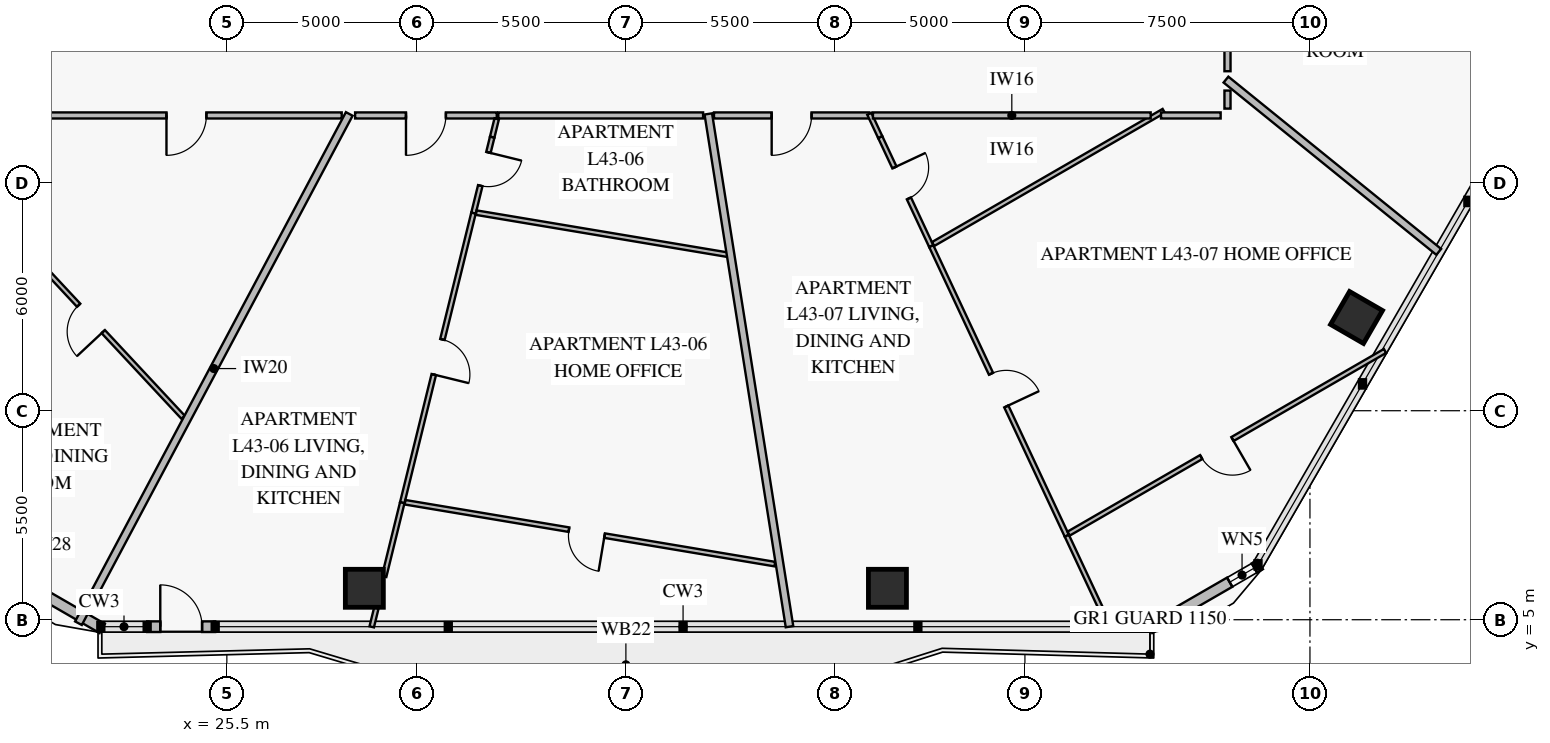
"""IFC4 building model, lengths in metres.
Left out: names, types, materials, properties, quantities, classifications, styles, units other than length and angle.
Written with IfcOpenShell. Run it as: python <this file> out.ifc"""

import sys

from ifc_helpers import new_model, si_unit, direction, frame, frame_2d, origin, origin_2d, place, context, subcontext, project, spatial, rectangle, extrude, element, fill, save


model = new_model("IFC4")
c1 = context("Model", 3, precision=1e-05, world=origin(), true_north=direction((0.0, 1.0)))
c2 = subcontext(c1, "Body", "Model", "MODEL_VIEW")
j1 = project(units=[si_unit("LENGTHUNIT", "METRE"), si_unit("PLANEANGLEUNIT", "RADIAN")], contexts=[c1])
p1 = place(None, origin())
s1 = spatial("IfcSite", under=j1, at=p1, CompositionType="ELEMENT")
p2 = place(p1, origin())
s2 = spatial("IfcBuilding", under=s1, at=p2, CompositionType="ELEMENT")
p3 = place(p2, frame((0.0, 0.0, 173.2)))
s3 = spatial("IfcBuildingStorey", under=s2, at=p3, CompositionType="ELEMENT", Elevation=173.2)
for number, where, z_axis, x_axis in (
    (1, (29.118, 5.827, 0.0), (0.0, 0.0, 1.0), (1.0, 0.0, 0.0)),
    (2, (42.882, 5.827, 0.0), (0.0, 0.0, 1.0), (1.0, 0.0, 0.0)),
    (3, (55.226, 12.953, 0.0), (0.0, 0.0, 1.0), (0.5, 0.866, 0.0)),
):
    element("IfcColumn", number, at=place(p3, frame(where, z_axis=z_axis, x_axis=x_axis)), inside=s3, PredefinedType="COLUMN", context=c2, shape_type="SweptSolid", body=[
        extrude(rectangle(XDim=1.0, YDim=1.0, at=origin_2d()), origin(), (0.0, 0.0, 1.0), 3.55),
    ])
p4 = place(p3, frame((52.693, 6.452, 0.0), z_axis=(0.0, 0.0, 1.0), x_axis=(-0.866020068361, -0.500009241111, 0.0)))
e4 = element("IfcWall", 4, at=p4, inside=s3, PredefinedType="SOLIDWALL", context=c2, shape_type="SweptSolid", body=[
    extrude(rectangle(XDim=3.365, YDim=0.28, at=frame_2d((1.683, 0.0))), origin(), (0.0, 0.0, 1.0), 3.55),
])
p5 = place(p4, frame((0.179, 0.0, 0.85)))
e5 = element("IfcOpeningElement", 5, at=p5, cuts=e4, PredefinedType="OPENING", context=c2, shape_type="SweptSolid", body=[
    extrude(rectangle(XDim=0.75, YDim=1.5, at=frame_2d((0.375, 0.75))), frame((0.0, 0.152, 0.0), z_axis=(0.0, -1.0, 0.0), x_axis=(1.0, 0.0, 0.0)), (0.0, 0.0, 1.0), 0.304),
])
p6 = place(p3, frame((25.193, 4.817, 0.0), z_axis=(0.0, 0.0, 1.0), x_axis=(-1.0, 0.0, 0.0)))
e6 = element("IfcWall", 6, at=p6, inside=s3, PredefinedType="SOLIDWALL", context=c2, shape_type="SweptSolid", body=[
    extrude(rectangle(XDim=1.79, YDim=0.28, at=frame_2d((0.895, 0.0))), origin(), (0.0, 0.0, 1.0), 3.55),
])
p7 = place(p6, frame((0.345, 0.0, 0.0)))
e7 = element("IfcOpeningElement", 7, at=p7, cuts=e6, PredefinedType="OPENING", context=c2, shape_type="SweptSolid", body=[
    extrude(rectangle(XDim=1.1, YDim=2.2, at=frame_2d((0.55, 1.1))), frame((0.0, 0.152, 0.0), z_axis=(0.0, -1.0, 0.0), x_axis=(1.0, 0.0, 0.0)), (0.0, 0.0, 1.0), 0.304),
])
p8 = place(p3, frame((22.221, 4.769, 0.0), z_axis=(0.0, 0.0, 1.0), x_axis=(-0.866020068361, 0.500009241111, 0.0)))
e8 = element("IfcWall", 8, at=p8, inside=s3, PredefinedType="SOLIDWALL", context=c2, shape_type="SweptSolid", body=[
    extrude(rectangle(XDim=3.365, YDim=0.28, at=frame_2d((1.683, 0.0))), origin(), (0.0, 0.0, 1.0), 3.55),
])
p9 = place(p3, frame((16.302, 18.958, 0.0), z_axis=(0.0, 0.0, 1.0), x_axis=(0.681998933698, -0.731353166695, 0.0)))
e9 = element("IfcWall", 9, at=p9, inside=s3, PredefinedType="PARTITIONING", context=c2, shape_type="SweptSolid", body=[
    extrude(rectangle(XDim=11.798, YDim=0.12, at=frame_2d((5.899, 0.0))), origin(), (0.0, 0.0, 1.0), 2.9),
])
p10 = place(p9, frame((2.11, 0.0, 0.0)))
e10 = element("IfcOpeningElement", 10, at=p10, cuts=e9, PredefinedType="OPENING", context=c2, shape_type="SweptSolid", body=[
    extrude(rectangle(XDim=0.95, YDim=2.1, at=frame_2d((0.475, 1.05))), frame((0.0, 0.072, 0.0), z_axis=(0.0, -1.0, 0.0), x_axis=(1.0, 0.0, 0.0)), (0.0, 0.0, 1.0), 0.144),
])
p11 = place(p9, frame((7.769, 0.0, 0.0)))
e11 = element("IfcOpeningElement", 11, at=p11, cuts=e9, PredefinedType="OPENING", context=c2, shape_type="SweptSolid", body=[
    extrude(rectangle(XDim=0.95, YDim=2.1, at=frame_2d((0.475, 1.05))), frame((0.0, 0.072, 0.0), z_axis=(0.0, -1.0, 0.0), x_axis=(1.0, 0.0, 0.0)), (0.0, 0.0, 1.0), 0.144),
])
p12 = place(p3, frame((20.35, 18.27, 0.0), z_axis=(0.0, 0.0, 1.0), x_axis=(1.0, 0.0, 0.0)))
e12 = element("IfcWall", 12, at=p12, inside=s3, PredefinedType="PARTITIONING", context=c2, shape_type="SweptSolid", body=[
    extrude(rectangle(XDim=8.172, YDim=0.16, at=frame_2d((4.086, 0.0))), origin(), (0.0, 0.0, 1.0), 2.9),
])
p13 = place(p12, frame((3.561, 0.0, 0.0)))
e13 = element("IfcOpeningElement", 13, at=p13, cuts=e12, PredefinedType="OPENING", context=c2, shape_type="SweptSolid", body=[
    extrude(rectangle(XDim=1.05, YDim=2.15, at=frame_2d((0.525, 1.075))), frame((0.0, 0.092, 0.0), z_axis=(0.0, -1.0, 0.0), x_axis=(1.0, 0.0, 0.0)), (0.0, 0.0, 1.0), 0.184),
])
p14 = place(p3, frame((32.482, 17.7, 0.0), z_axis=(0.0, 0.0, 1.0), x_axis=(-0.238993265464, -0.971021224826, 0.0)))
e14 = element("IfcWall", 14, at=p14, inside=s3, PredefinedType="PARTITIONING", context=c2, shape_type="SweptSolid", body=[
    extrude(rectangle(XDim=2.061, YDim=0.12, at=frame_2d((1.03, 0.0))), origin(), (0.0, 0.0, 1.0), 3.55),
])
p15 = place(p14, frame((0.415, 0.0, 0.0)))
e15 = element("IfcOpeningElement", 15, at=p15, cuts=e14, PredefinedType="OPENING", context=c2, shape_type="SweptSolid", body=[
    extrude(rectangle(XDim=0.9, YDim=2.1, at=frame_2d((0.45, 1.05))), frame((0.0, 0.072, 0.0), z_axis=(0.0, -1.0, 0.0), x_axis=(1.0, 0.0, 0.0)), (0.0, 0.0, 1.0), 0.144),
])
p16 = place(p3, frame((31.99, 15.699, 0.0), z_axis=(0.0, 0.0, 1.0), x_axis=(-0.238859295783, -0.971054188405, 0.0)))
e16 = element("IfcWall", 16, at=p16, inside=s3, PredefinedType="PARTITIONING", context=c2, shape_type="SweptSolid", body=[
    extrude(rectangle(XDim=7.848, YDim=0.12, at=frame_2d((3.924, 0.0))), origin(), (0.0, 0.0, 1.0), 3.15),
])
p17 = place(p16, frame((3.424, 0.0, 0.0)))
e17 = element("IfcOpeningElement", 17, at=p17, cuts=e16, PredefinedType="OPENING", context=c2, shape_type="SweptSolid", body=[
    extrude(rectangle(XDim=0.95, YDim=2.1, at=frame_2d((0.475, 1.05))), frame((0.0, 0.072, 0.0), z_axis=(0.0, -1.0, 0.0), x_axis=(1.0, 0.0, 0.0)), (0.0, 0.0, 1.0), 0.144),
])
p18 = place(p3, frame((30.189, 8.092, 0.0), z_axis=(0.0, 0.0, 1.0), x_axis=(0.986287356635, -0.165037117469, 0.0)))
e18 = element("IfcWall", 18, at=p18, inside=s3, PredefinedType="PARTITIONING", context=c2, shape_type="SweptSolid", body=[
    extrude(rectangle(XDim=9.864, YDim=0.12, at=frame_2d((4.932, 0.0))), origin(), (0.0, 0.0, 1.0), 3.55),
])
p19 = place(p18, frame((4.373, 0.0, 0.0)))
e19 = element("IfcOpeningElement", 19, at=p19, cuts=e18, PredefinedType="OPENING", context=c2, shape_type="SweptSolid", body=[
    extrude(rectangle(XDim=0.95, YDim=2.1, at=frame_2d((0.475, 1.05))), frame((0.0, 0.072, 0.0), z_axis=(0.0, -1.0, 0.0), x_axis=(1.0, 0.0, 0.0)), (0.0, 0.0, 1.0), 0.144),
])
p20 = place(p3, frame((28.875, 18.27, 0.0), z_axis=(0.0, 0.0, 1.0), x_axis=(1.0, 0.0, 0.0)))
e20 = element("IfcWall", 20, at=p20, inside=s3, PredefinedType="PARTITIONING", context=c2, shape_type="SweptSolid", body=[
    extrude(rectangle(XDim=3.727, YDim=0.16, at=frame_2d((1.863, 0.0))), origin(), (0.0, 0.0, 1.0), 2.9),
])
p21 = place(p20, frame((1.338, 0.0, 0.0)))
e21 = element("IfcOpeningElement", 21, at=p21, cuts=e20, PredefinedType="OPENING", context=c2, shape_type="SweptSolid", body=[
    extrude(rectangle(XDim=1.05, YDim=2.15, at=frame_2d((0.525, 1.075))), frame((0.0, 0.092, 0.0), z_axis=(0.0, -1.0, 0.0), x_axis=(1.0, 0.0, 0.0)), (0.0, 0.0, 1.0), 0.184),
])
p22 = place(p3, frame((42.692, 17.7, 0.0), z_axis=(0.0, 0.0, 1.0), x_axis=(0.423922627961, -0.905698407585, 0.0)))
e22 = element("IfcWall", 22, at=p22, inside=s3, PredefinedType="PARTITIONING", context=c2, shape_type="SweptSolid", body=[
    extrude(rectangle(XDim=3.169, YDim=0.12, at=frame_2d((1.584, 0.0))), origin(), (0.0, 0.0, 1.0), 3.55),
])
p23 = place(p22, frame((0.881, 0.0, 0.0)))
e23 = element("IfcOpeningElement", 23, at=p23, cuts=e22, PredefinedType="OPENING", context=c2, shape_type="SweptSolid", body=[
    extrude(rectangle(XDim=0.9, YDim=2.1, at=frame_2d((0.45, 1.05))), frame((0.0, 0.072, 0.0), z_axis=(0.0, -1.0, 0.0), x_axis=(1.0, 0.0, 0.0)), (0.0, 0.0, 1.0), 0.144),
])
p24 = place(p3, frame((44.036, 14.83, 0.0), z_axis=(0.0, 0.0, 1.0), x_axis=(0.423895538652, -0.905711086556, 0.0)))
e24 = element("IfcWall", 24, at=p24, inside=s3, PredefinedType="PARTITIONING", context=c2, shape_type="SweptSolid", body=[
    extrude(rectangle(XDim=8.413, YDim=0.12, at=frame_2d((4.207, 0.0))), origin(), (0.0, 0.0, 1.0), 2.87),
])
p25 = place(p24, frame((3.707, 0.0, 0.0)))
e25 = element("IfcOpeningElement", 25, at=p25, cuts=e24, PredefinedType="OPENING", context=c2, shape_type="SweptSolid", body=[
    extrude(rectangle(XDim=0.95, YDim=2.1, at=frame_2d((0.475, 1.05))), frame((0.0, 0.072, 0.0), z_axis=(0.0, -1.0, 0.0), x_axis=(1.0, 0.0, 0.0)), (0.0, 0.0, 1.0), 0.144),
])
p26 = place(p3, frame((47.651, 7.266, 0.0), z_axis=(0.0, 0.0, 1.0), x_axis=(0.86602613873, 0.499998727035, 0.0)))
e26 = element("IfcWall", 26, at=p26, inside=s3, PredefinedType="PARTITIONING", context=c2, shape_type="SweptSolid", body=[
    extrude(rectangle(XDim=9.613, YDim=0.12, at=frame_2d((4.806, 0.0))), origin(), (0.0, 0.0, 1.0), 3.122),
])
p27 = place(p26, frame((4.027, 0.0, 0.0)))
e27 = element("IfcOpeningElement", 27, at=p27, cuts=e26, PredefinedType="OPENING", context=c2, shape_type="SweptSolid", body=[
    extrude(rectangle(XDim=0.95, YDim=2.1, at=frame_2d((0.475, 1.05))), frame((0.0, 0.072, 0.0), z_axis=(0.0, -1.0, 0.0), x_axis=(1.0, 0.0, 0.0)), (0.0, 0.0, 1.0), 0.144),
])
p28 = place(p3, frame((38.318, 18.27, 0.0), z_axis=(0.0, 0.0, 1.0), x_axis=(1.0, 0.0, 0.0)))
e28 = element("IfcWall", 28, at=p28, inside=s3, PredefinedType="PARTITIONING", context=c2, shape_type="SweptSolid", body=[
    extrude(rectangle(XDim=4.086, YDim=0.16, at=frame_2d((2.043, 0.0))), origin(), (0.0, 0.0, 1.0), 2.9),
])
p29 = place(p28, frame((1.518, 0.0, 0.0)))
e29 = element("IfcOpeningElement", 29, at=p29, cuts=e28, PredefinedType="OPENING", context=c2, shape_type="SweptSolid", body=[
    extrude(rectangle(XDim=1.05, YDim=2.15, at=frame_2d((0.525, 1.075))), frame((0.0, 0.092, 0.0), z_axis=(0.0, -1.0, 0.0), x_axis=(1.0, 0.0, 0.0)), (0.0, 0.0, 1.0), 0.184),
])
p30 = place(p3, frame((28.721, 18.31, 0.0), z_axis=(0.0, 0.0, 1.0), x_axis=(-0.469463317487, -0.882951976913, 0.0)))
e30 = element("IfcWall", 30, at=p30, inside=s3, PredefinedType="PARTITIONING", context=c2, shape_type="SweptSolid", body=[
    extrude(rectangle(XDim=15.178, YDim=0.2, at=frame_2d((7.589, 0.0))), origin(), (0.0, 0.0, 1.0), 2.87),
])
p31 = place(p3, frame((32.601, 18.182, 0.0), z_axis=(0.0, 0.0, 1.0), x_axis=(-0.238597992299, -0.971118426388, 0.0)))
e31 = element("IfcWall", 31, at=p31, inside=s3, PredefinedType="PARTITIONING", context=c2, shape_type="SweptSolid", body=[
    extrude(rectangle(XDim=0.496, YDim=0.12, at=frame_2d((0.248, 0.0))), origin(), (0.0, 0.0, 1.0), 3.55),
])
p32 = place(p3, frame((30.115, 8.079, 0.0), z_axis=(0.0, 0.0, 1.0), x_axis=(-0.238912739116, -0.971041040887, 0.0)))
e32 = element("IfcWall", 32, at=p32, inside=s3, PredefinedType="PARTITIONING", context=c2, shape_type="SweptSolid", body=[
    extrude(rectangle(XDim=1.999, YDim=0.12, at=frame_2d((1.0, 0.0))), origin(), (0.0, 0.0, 1.0), 3.55),
])
p33 = place(p3, frame((29.434, 5.307, 0.0), z_axis=(0.0, 0.0, 1.0), x_axis=(-0.238810360324, -0.97106622421, 0.0)))
e33 = element("IfcWall", 33, at=p33, inside=s3, PredefinedType="PARTITIONING", context=c2, shape_type="SweptSolid", body=[
    extrude(rectangle(XDim=0.509, YDim=0.12, at=frame_2d((0.254, 0.0))), origin(), (0.0, 0.0, 1.0), 3.55),
])
p34 = place(p3, frame((32.063, 15.712, 0.0), z_axis=(0.0, 0.0, 1.0), x_axis=(0.986279965102, -0.165081284339, 0.0)))
e34 = element("IfcWall", 34, at=p34, inside=s3, PredefinedType="PARTITIONING", context=c2, shape_type="SweptSolid", body=[
    extrude(rectangle(XDim=6.73, YDim=0.12, at=frame_2d((3.365, 0.0))), origin(), (0.0, 0.0, 1.0), 3.55),
])
p35 = place(p3, frame((38.168, 18.31, 0.0), z_axis=(0.0, 0.0, 1.0), x_axis=(0.156441591032, -0.987687211923, 0.0)))
e35 = element("IfcWall", 35, at=p35, inside=s3, PredefinedType="PARTITIONING", context=c2, shape_type="SweptSolid", body=[
    extrude(rectangle(XDim=13.661, YDim=0.2, at=frame_2d((6.831, 0.0))), origin(), (0.0, 0.0, 1.0), 2.87),
])
p36 = place(p3, frame((42.406, 18.312, 0.0), z_axis=(0.0, 0.0, 1.0), x_axis=(0.423814093748, -0.905749200353, 0.0)))
e36 = element("IfcWall", 36, at=p36, inside=s3, PredefinedType="PARTITIONING", context=c2, shape_type="SweptSolid", body=[
    extrude(rectangle(XDim=0.676, YDim=0.12, at=frame_2d((0.338, 0.0))), origin(), (0.0, 0.0, 1.0), 3.55),
])
p37 = place(p3, frame((47.602, 7.209, 0.0), z_axis=(0.0, 0.0, 1.0), x_axis=(0.423895034456, -0.905711322532, 0.0)))
e37 = element("IfcWall", 37, at=p37, inside=s3, PredefinedType="PARTITIONING", context=c2, shape_type="SweptSolid", body=[
    extrude(rectangle(XDim=2.647, YDim=0.12, at=frame_2d((1.323, 0.0))), origin(), (0.0, 0.0, 1.0), 3.55),
])
p38 = place(p3, frame((44.084, 14.886, 0.0), z_axis=(0.0, 0.0, 1.0), x_axis=(0.866034731829, 0.499983843005, 0.0)))
e38 = element("IfcWall", 38, at=p38, inside=s3, PredefinedType="PARTITIONING", context=c2, shape_type="SweptSolid", body=[
    extrude(rectangle(XDim=7.007, YDim=0.12, at=frame_2d((3.503, 0.0))), origin(), (0.0, 0.0, 1.0), 2.9),
])
p39 = place(p3, frame((51.79, 19.213, 0.0), z_axis=(0.0, 0.0, 1.0), x_axis=(0.777161996324, -0.629300589122, 0.0)))
e39 = element("IfcWall", 39, at=p39, inside=s3, PredefinedType="PARTITIONING", context=c2, shape_type="SweptSolid", body=[
    extrude(rectangle(XDim=7.204, YDim=0.2, at=frame_2d((3.602, 0.0))), origin(), (0.0, 0.0, 1.0), 2.87),
])
p40 = place(p3, frame((32.643, 18.27, 0.0), z_axis=(0.0, 0.0, 1.0), x_axis=(1.0, 0.0, 0.0)))
e40 = element("IfcWall", 40, at=p40, inside=s3, PredefinedType="PARTITIONING", context=c2, shape_type="SweptSolid", body=[
    extrude(rectangle(XDim=5.389, YDim=0.16, at=frame_2d((2.694, 0.0))), origin(), (0.0, 0.0, 1.0), 3.55),
])
p41 = place(p3, frame((42.501, 18.27, 0.0), z_axis=(0.0, 0.0, 1.0), x_axis=(1.0, 0.0, 0.0)))
e41 = element("IfcWall", 41, at=p41, inside=s3, PredefinedType="PARTITIONING", context=c2, shape_type="SweptSolid", body=[
    extrude(rectangle(XDim=7.308, YDim=0.16, at=frame_2d((3.654, 0.0))), origin(), (0.0, 0.0, 1.0), 2.9),
])
p42 = place(p3, frame((50.081, 18.27, 0.0), z_axis=(0.0, 0.0, 1.0), x_axis=(1.0, 0.0, 0.0)))
e42 = element("IfcWall", 42, at=p42, inside=s3, PredefinedType="PARTITIONING", context=c2, shape_type="SweptSolid", body=[
    extrude(rectangle(XDim=1.569, YDim=0.16, at=frame_2d((0.785, 0.0))), origin(), (0.0, 0.0, 1.0), 3.15),
])
p43 = place(p3, frame((51.83, 18.45, 0.0), z_axis=(0.0, 0.0, 1.0), x_axis=(0.0, 1.0, 0.0)))
e43 = element("IfcWall", 43, at=p43, inside=s3, PredefinedType="PARTITIONING", context=c2, shape_type="SweptSolid", body=[
    extrude(rectangle(XDim=0.475, YDim=0.16, at=frame_2d((0.237, 0.0))), origin(), (0.0, 0.0, 1.0), 3.55),
])
p44 = place(p3, frame((51.83, 19.434, 0.0), z_axis=(0.0, 0.0, 1.0), x_axis=(0.0, 1.0, 0.0)))
e44 = element("IfcWall", 44, at=p44, inside=s3, PredefinedType="PARTITIONING", context=c2, shape_type="SweptSolid", body=[
    extrude(rectangle(XDim=2.716, YDim=0.16, at=frame_2d((1.358, 0.0))), origin(), (0.0, 0.0, 1.0), 3.15),
])
p45 = place(p5, origin())
e45 = element("IfcWindow", 45, at=p45, inside=s3, PartitioningType="SINGLE_PANEL", PredefinedType="WINDOW", context=c2, shape_type="SweptSolid", body=[
    extrude(rectangle(XDim=0.75, YDim=1.5, at=frame_2d((0.375, 0.75))), frame((0.0, 0.03, 0.0), z_axis=(0.0, -1.0, 0.0), x_axis=(1.0, 0.0, 0.0)), (0.0, 0.0, 1.0), 0.06),
])
fill(e5, e45)
p46 = place(p7, frame((1.1, 0.0, 0.0), z_axis=(0.0, 0.0, 1.0), x_axis=(-1.0, 0.0, 0.0)))
e46 = element("IfcDoor", 46, at=p46, inside=s3, OperationType="SINGLE_SWING_LEFT", PredefinedType="DOOR", context=c2, shape_type="SweptSolid", body=[
    extrude(rectangle(XDim=1.1, YDim=2.2, at=frame_2d((0.55, 1.1))), frame((0.0, 0.025, 0.0), z_axis=(0.0, -1.0, 0.0), x_axis=(1.0, 0.0, 0.0)), (0.0, 0.0, 1.0), 0.05),
])
fill(e7, e46)
p47 = place(p11, frame((0.95, 0.0, 0.0), z_axis=(0.0, 0.0, 1.0), x_axis=(-1.0, 0.0, 0.0)))
e47 = element("IfcDoor", 47, at=p47, inside=s3, OperationType="SINGLE_SWING_LEFT", PredefinedType="DOOR", context=c2, shape_type="SweptSolid", body=[
    extrude(rectangle(XDim=0.95, YDim=2.1, at=frame_2d((0.475, 1.05))), frame((0.0, 0.025, 0.0), z_axis=(0.0, -1.0, 0.0), x_axis=(1.0, 0.0, 0.0)), (0.0, 0.0, 1.0), 0.05),
])
fill(e11, e47)
p48 = place(p13, frame((1.05, 0.0, 0.0), z_axis=(0.0, 0.0, 1.0), x_axis=(-1.0, 0.0, 0.0)))
e48 = element("IfcDoor", 48, at=p48, inside=s3, OperationType="SINGLE_SWING_RIGHT", PredefinedType="DOOR", context=c2, shape_type="SweptSolid", body=[
    extrude(rectangle(XDim=1.05, YDim=2.15, at=frame_2d((0.525, 1.075))), frame((0.0, 0.025, 0.0), z_axis=(0.0, -1.0, 0.0), x_axis=(1.0, 0.0, 0.0)), (0.0, 0.0, 1.0), 0.05),
])
fill(e13, e48)
p49 = place(p15, origin())
e49 = element("IfcDoor", 49, at=p49, inside=s3, OperationType="SINGLE_SWING_LEFT", PredefinedType="DOOR", context=c2, shape_type="SweptSolid", body=[
    extrude(rectangle(XDim=0.9, YDim=2.1, at=frame_2d((0.45, 1.05))), frame((0.0, 0.025, 0.0), z_axis=(0.0, -1.0, 0.0), x_axis=(1.0, 0.0, 0.0)), (0.0, 0.0, 1.0), 0.05),
])
fill(e15, e49)
p50 = place(p17, origin())
e50 = element("IfcDoor", 50, at=p50, inside=s3, OperationType="SINGLE_SWING_RIGHT", PredefinedType="DOOR", context=c2, shape_type="SweptSolid", body=[
    extrude(rectangle(XDim=0.95, YDim=2.1, at=frame_2d((0.475, 1.05))), frame((0.0, 0.025, 0.0), z_axis=(0.0, -1.0, 0.0), x_axis=(1.0, 0.0, 0.0)), (0.0, 0.0, 1.0), 0.05),
])
fill(e17, e50)
p51 = place(p19, frame((0.95, 0.0, 0.0), z_axis=(0.0, 0.0, 1.0), x_axis=(-1.0, 0.0, 0.0)))
e51 = element("IfcDoor", 51, at=p51, inside=s3, OperationType="SINGLE_SWING_LEFT", PredefinedType="DOOR", context=c2, shape_type="SweptSolid", body=[
    extrude(rectangle(XDim=0.95, YDim=2.1, at=frame_2d((0.475, 1.05))), frame((0.0, 0.025, 0.0), z_axis=(0.0, -1.0, 0.0), x_axis=(1.0, 0.0, 0.0)), (0.0, 0.0, 1.0), 0.05),
])
fill(e19, e51)
p52 = place(p21, frame((1.05, 0.0, 0.0), z_axis=(0.0, 0.0, 1.0), x_axis=(-1.0, 0.0, 0.0)))
e52 = element("IfcDoor", 52, at=p52, inside=s3, OperationType="SINGLE_SWING_RIGHT", PredefinedType="DOOR", context=c2, shape_type="SweptSolid", body=[
    extrude(rectangle(XDim=1.05, YDim=2.15, at=frame_2d((0.525, 1.075))), frame((0.0, 0.025, 0.0), z_axis=(0.0, -1.0, 0.0), x_axis=(1.0, 0.0, 0.0)), (0.0, 0.0, 1.0), 0.05),
])
fill(e21, e52)
p53 = place(p23, origin())
e53 = element("IfcDoor", 53, at=p53, inside=s3, OperationType="SINGLE_SWING_LEFT", PredefinedType="DOOR", context=c2, shape_type="SweptSolid", body=[
    extrude(rectangle(XDim=0.9, YDim=2.1, at=frame_2d((0.45, 1.05))), frame((0.0, 0.025, 0.0), z_axis=(0.0, -1.0, 0.0), x_axis=(1.0, 0.0, 0.0)), (0.0, 0.0, 1.0), 0.05),
])
fill(e23, e53)
p54 = place(p25, origin())
e54 = element("IfcDoor", 54, at=p54, inside=s3, OperationType="SINGLE_SWING_RIGHT", PredefinedType="DOOR", context=c2, shape_type="SweptSolid", body=[
    extrude(rectangle(XDim=0.95, YDim=2.1, at=frame_2d((0.475, 1.05))), frame((0.0, 0.025, 0.0), z_axis=(0.0, -1.0, 0.0), x_axis=(1.0, 0.0, 0.0)), (0.0, 0.0, 1.0), 0.05),
])
fill(e25, e54)
p55 = place(p27, frame((0.95, 0.0, 0.0), z_axis=(0.0, 0.0, 1.0), x_axis=(-1.0, 0.0, 0.0)))
e55 = element("IfcDoor", 55, at=p55, inside=s3, OperationType="SINGLE_SWING_LEFT", PredefinedType="DOOR", context=c2, shape_type="SweptSolid", body=[
    extrude(rectangle(XDim=0.95, YDim=2.1, at=frame_2d((0.475, 1.05))), frame((0.0, 0.025, 0.0), z_axis=(0.0, -1.0, 0.0), x_axis=(1.0, 0.0, 0.0)), (0.0, 0.0, 1.0), 0.05),
])
fill(e27, e55)
p56 = place(p29, frame((1.05, 0.0, 0.0), z_axis=(0.0, 0.0, 1.0), x_axis=(-1.0, 0.0, 0.0)))
e56 = element("IfcDoor", 56, at=p56, inside=s3, OperationType="SINGLE_SWING_RIGHT", PredefinedType="DOOR", context=c2, shape_type="SweptSolid", body=[
    extrude(rectangle(XDim=1.05, YDim=2.15, at=frame_2d((0.525, 1.075))), frame((0.0, 0.025, 0.0), z_axis=(0.0, -1.0, 0.0), x_axis=(1.0, 0.0, 0.0)), (0.0, 0.0, 1.0), 0.05),
])
fill(e29, e56)
save(model, sys.argv[1])
